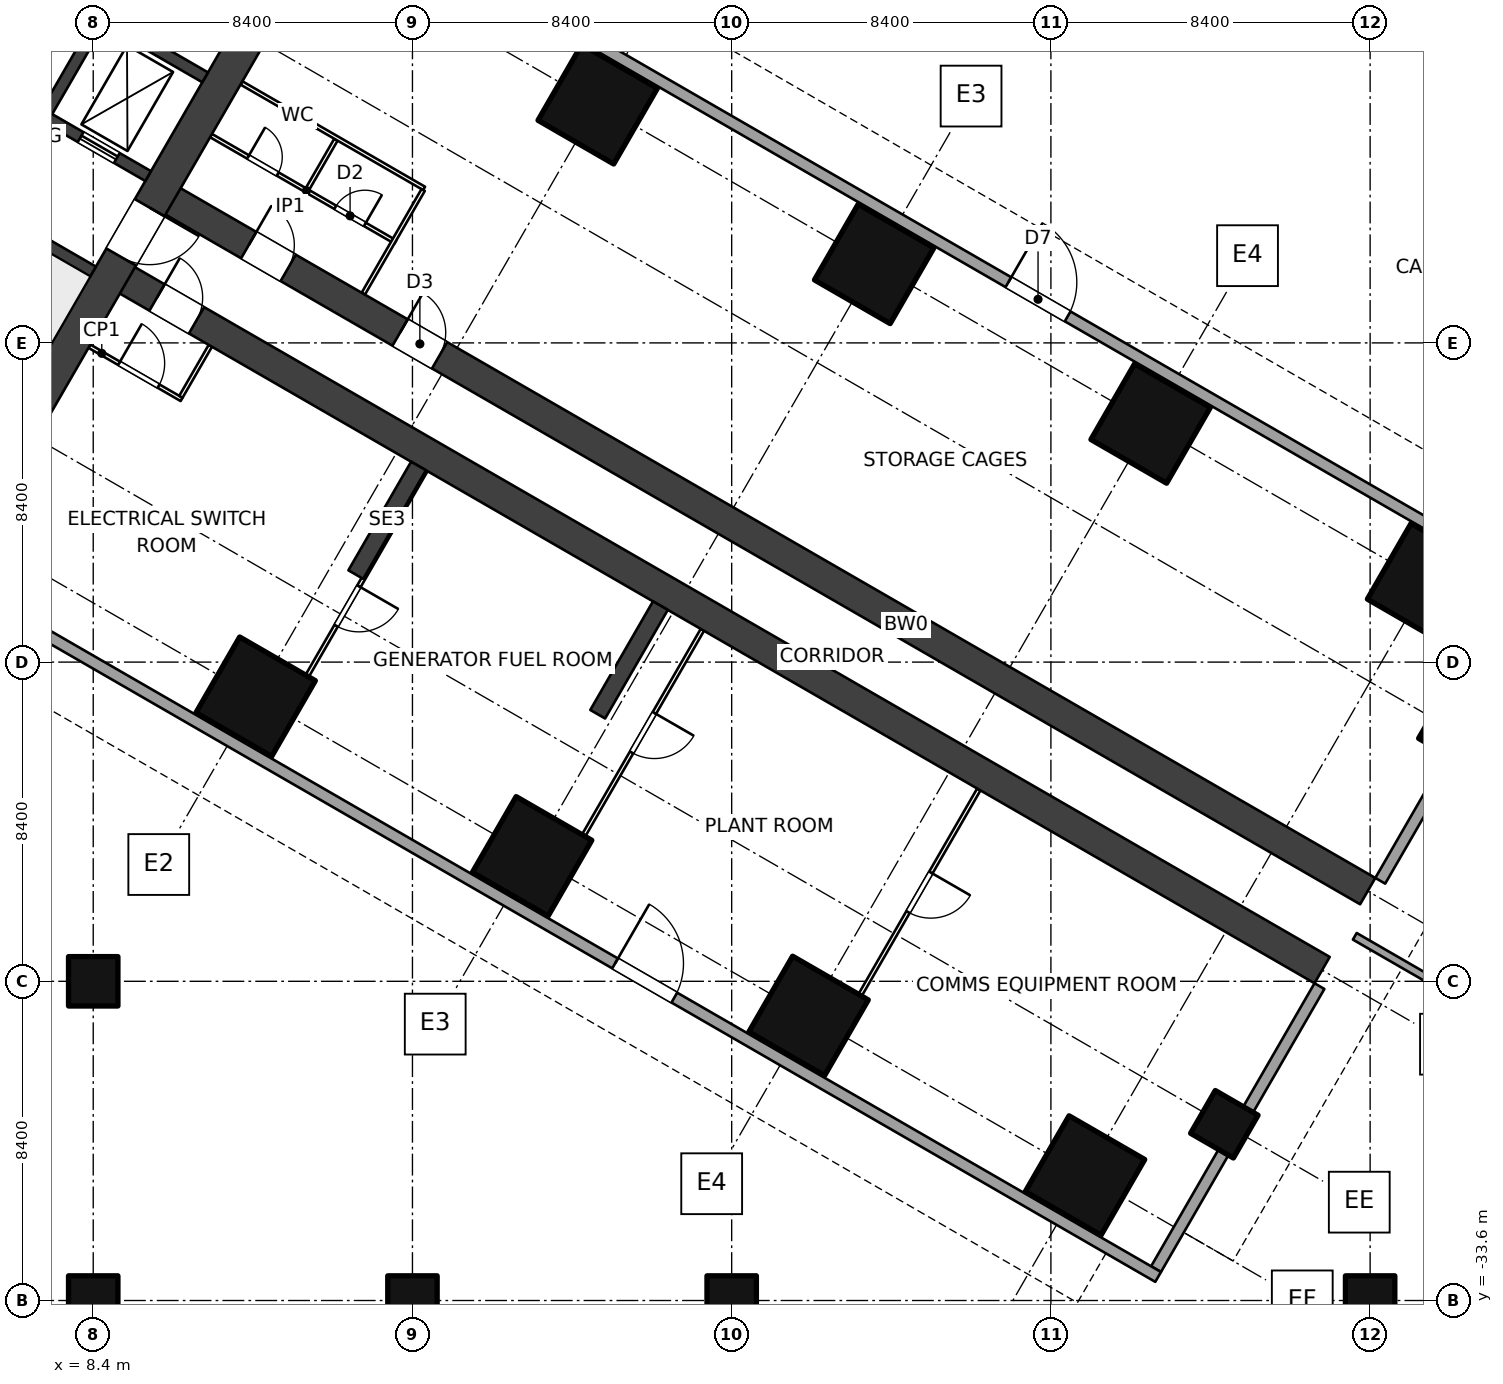
"""IFC4 building model, lengths in metres.
Left out: names, types, materials, properties, quantities, classifications, styles, units other than length and angle.
Written with IfcOpenShell. Run it as: python <this file> out.ifc"""

import sys

from ifc_helpers import new_model, si_unit, direction, frame, frame_2d, origin, origin_2d, place, context, subcontext, project, spatial, rectangle, extrude, element, fill, save


model = new_model("IFC4")
c1 = context("Model", 3, precision=1e-05, world=origin(), true_north=direction((0.0, 1.0)))
c2 = subcontext(c1, "Body", "Model", "MODEL_VIEW")
j1 = project(units=[si_unit("LENGTHUNIT", "METRE"), si_unit("PLANEANGLEUNIT", "RADIAN")], contexts=[c1])
p1 = place(None, origin())
s1 = spatial("IfcSite", under=j1, at=p1, CompositionType="ELEMENT")
p2 = place(p1, origin())
s2 = spatial("IfcBuilding", under=s1, at=p2, CompositionType="ELEMENT")
p3 = place(p2, frame((0.0, 0.0, -10.5)))
s3 = spatial("IfcBuildingStorey", under=s2, at=p3, CompositionType="ELEMENT", Elevation=-10.5)
for number, where, z_axis, x_axis in (
    (1, (21.675, -2.122, 0.0), (0.0, 0.0, 1.0), (-0.5, -0.866, 0.0)),
    (2, (12.675, -17.71, 0.0), (0.0, 0.0, 1.0), (-0.5, -0.866, 0.0)),
    (3, (28.949, -6.322, 0.0), (0.0, 0.0, 1.0), (-0.5, -0.866, 0.0)),
    (4, (19.949, -21.91, 0.0), (0.0, 0.0, 1.0), (-0.5, -0.866, 0.0)),
    (5, (36.224, -10.521, 0.0), (0.0, 0.0, 1.0), (-0.5, -0.866, 0.0)),
    (6, (27.224, -26.11, 0.0), (0.0, 0.0, 1.0), (-0.5, -0.866, 0.0)),
    (7, (43.499, -14.721, 0.0), (0.0, 0.0, 1.0), (-0.5, -0.866, 0.0)),
    (8, (34.499, -30.31, 0.0), (0.0, 0.0, 1.0), (-0.5, -0.866, 0.0)),
):
    element("IfcColumn", number, at=place(p3, frame(where, z_axis=z_axis, x_axis=x_axis)), inside=s3, PredefinedType="COLUMN", context=c2, shape_type="SweptSolid", body=[
        extrude(rectangle(XDim=2.3, YDim=2.3, at=origin_2d()), origin(), (0.0, 0.0, 1.0), 3.5),
    ])
for number, where, z_axis, x_axis in (
    (9, (44.164, -18.57, 0.0), (0.0, 0.0, 1.0), (-0.5, -0.866, 0.0)),
    (10, (38.164, -28.962, 0.0), (0.0, 0.0, 1.0), (-0.5, -0.866, 0.0)),
    (11, (8.4, -33.6, 0.0), (0.0, 0.0, 1.0), (1.0, 0.0, 0.0)),
    (12, (8.4, -25.2, 0.0), (0.0, 0.0, 1.0), (1.0, 0.0, 0.0)),
    (13, (16.8, -33.6, 0.0), (0.0, 0.0, 1.0), (1.0, 0.0, 0.0)),
    (14, (25.2, -33.6, 0.0), (0.0, 0.0, 1.0), (1.0, 0.0, 0.0)),
    (15, (42.0, -33.6, 0.0), (0.0, 0.0, 1.0), (1.0, 0.0, 0.0)),
):
    element("IfcColumn", number, at=place(p3, frame(where, z_axis=z_axis, x_axis=x_axis)), inside=s3, PredefinedType="COLUMN", context=c2, shape_type="SweptSolid", body=[
        extrude(rectangle(XDim=1.3, YDim=1.3, at=origin_2d()), origin(), (0.0, 0.0, 1.0), 3.5),
    ])
p4 = place(p3, frame((12.551, -0.225, 0.0), z_axis=(0.0, 0.0, 1.0), x_axis=(-0.499997612506, -0.8660267822, 0.0)))
e16 = element("IfcWall", 16, at=p4, inside=s3, PredefinedType="SHEAR", context=c2, shape_type="SweptSolid", body=[
    extrude(rectangle(XDim=12.161, YDim=0.9, at=frame_2d((6.08, 0.0))), origin(), (0.0, 0.0, 1.0), 3.5),
])
p5 = place(p4, frame((5.33, 0.0, 0.0)))
e17 = element("IfcOpeningElement", 17, at=p5, cuts=e16, PredefinedType="OPENING", context=c2, shape_type="SweptSolid", body=[
    extrude(rectangle(XDim=1.5, YDim=2.1, at=frame_2d((0.75, 1.05))), frame((0.0, 0.46, 0.0), z_axis=(0.0, -1.0, 0.0), x_axis=(1.0, 0.0, 0.0)), (0.0, 0.0, 1.0), 0.92),
])
p6 = place(p3, frame((2.419, -3.071, 0.0), z_axis=(0.0, 0.0, 1.0), x_axis=(0.86602711848, -0.499997030048, 0.0)))
e18 = element("IfcWall", 18, at=p6, inside=s3, PredefinedType="SHEAR", context=c2, shape_type="SweptSolid", body=[
    extrude(rectangle(XDim=6.901, YDim=0.3, at=frame_2d((3.451, 0.0))), origin(), (0.0, 0.0, 1.0), 3.5),
])
p7 = place(p6, frame((0.25, 0.0, 0.0)))
e19 = element("IfcOpeningElement", 19, at=p7, cuts=e18, PredefinedType="OPENING", context=c2, shape_type="SweptSolid", body=[
    extrude(rectangle(XDim=1.0, YDim=2.1, at=frame_2d((0.5, 1.05))), frame((0.0, 0.16, 0.0), z_axis=(0.0, -1.0, 0.0), x_axis=(1.0, 0.0, 0.0)), (0.0, 0.0, 1.0), 0.32),
])
p8 = place(p3, frame((3.869, -0.559, 0.0), z_axis=(0.0, 0.0, 1.0), x_axis=(0.86602711848, -0.499997030048, 0.0)))
e20 = element("IfcWall", 20, at=p8, inside=s3, PredefinedType="SHEAR", context=c2, shape_type="SweptSolid", body=[
    extrude(rectangle(XDim=6.901, YDim=0.3, at=frame_2d((3.451, 0.0))), origin(), (0.0, 0.0, 1.0), 3.5),
])
p9 = place(p8, frame((4.85, 0.0, 0.0)))
e21 = element("IfcOpeningElement", 21, at=p9, cuts=e20, PredefinedType="OPENING", context=c2, shape_type="SweptSolid", body=[
    extrude(rectangle(XDim=1.1, YDim=2.1, at=frame_2d((0.55, 1.05))), frame((0.0, 0.16, 0.0), z_axis=(0.0, -1.0, 0.0), x_axis=(1.0, 0.0, 0.0)), (0.0, 0.0, 1.0), 0.32),
])
p10 = place(p3, frame((5.369, 2.039, 0.0), z_axis=(0.0, 0.0, 1.0), x_axis=(0.86602711848, -0.499997030048, 0.0)))
e22 = element("IfcWall", 22, at=p10, inside=s3, PredefinedType="SHEAR", context=c2, shape_type="SweptSolid", body=[
    extrude(rectangle(XDim=6.901, YDim=0.3, at=frame_2d((3.451, 0.0))), origin(), (0.0, 0.0, 1.0), 3.5),
])
p11 = place(p3, frame((8.541, 0.034, 0.0), z_axis=(0.0, 0.0, 1.0), x_axis=(-0.50000943426, -0.866019956843, 0.0)))
e23 = element("IfcWall", 23, at=p11, inside=s3, PredefinedType="SHEAR", context=c2, shape_type="SweptSolid", body=[
    extrude(rectangle(XDim=2.7, YDim=0.3, at=frame_2d((1.35, 0.0))), origin(), (0.0, 0.0, 1.0), 3.5),
])
p12 = place(p3, frame((10.11, -4.451, 0.0), z_axis=(0.0, 0.0, 1.0), x_axis=(0.866025284237, -0.500000207062, 0.0)))
e24 = element("IfcWall", 24, at=p12, inside=s3, PredefinedType="SHEAR", context=c2, shape_type="SweptSolid", body=[
    extrude(rectangle(XDim=36.75, YDim=0.8, at=frame_2d((18.375, 0.0))), origin(), (0.0, 0.0, 1.0), 3.5),
])
p13 = place(p12, frame((2.75, 0.0, 0.0)))
e25 = element("IfcOpeningElement", 25, at=p13, cuts=e24, PredefinedType="OPENING", context=c2, shape_type="SweptSolid", body=[
    extrude(rectangle(XDim=1.2, YDim=2.1, at=frame_2d((0.6, 1.05))), frame((0.0, 0.41, 0.0), z_axis=(0.0, -1.0, 0.0), x_axis=(1.0, 0.0, 0.0)), (0.0, 0.0, 1.0), 0.82),
])
p14 = place(p12, frame((7.35, 0.0, 0.0)))
e26 = element("IfcOpeningElement", 26, at=p14, cuts=e24, PredefinedType="OPENING", context=c2, shape_type="SweptSolid", body=[
    extrude(rectangle(XDim=1.2, YDim=2.1, at=frame_2d((0.6, 1.05))), frame((0.0, 0.41, 0.0), z_axis=(0.0, -1.0, 0.0), x_axis=(1.0, 0.0, 0.0)), (0.0, 0.0, 1.0), 0.82),
])
p15 = place(p3, frame((8.91, -6.53, 0.0), z_axis=(0.0, 0.0, 1.0), x_axis=(0.866025284237, -0.500000207062, 0.0)))
e27 = element("IfcWall", 27, at=p15, inside=s3, PredefinedType="SHEAR", context=c2, shape_type="SweptSolid", body=[
    extrude(rectangle(XDim=36.75, YDim=0.8, at=frame_2d((18.375, 0.0))), origin(), (0.0, 0.0, 1.0), 3.5),
])
p16 = place(p15, frame((1.35, 0.0, 0.0)))
e28 = element("IfcOpeningElement", 28, at=p16, cuts=e27, PredefinedType="OPENING", context=c2, shape_type="SweptSolid", body=[
    extrude(rectangle(XDim=1.2, YDim=2.1, at=frame_2d((0.6, 1.05))), frame((0.0, 0.41, 0.0), z_axis=(0.0, -1.0, 0.0), x_axis=(1.0, 0.0, 0.0)), (0.0, 0.0, 1.0), 0.82),
])
p17 = place(p3, frame((11.5, -2.945, 0.0), z_axis=(0.0, 0.0, 1.0), x_axis=(0.866045472092, -0.499965239061, 0.0)))
e29 = element("IfcWall", 29, at=p17, inside=s3, PredefinedType="PARTITIONING", context=c2, shape_type="SweptSolid", body=[
    extrude(rectangle(XDim=5.6, YDim=0.1, at=frame_2d((2.8, 0.0))), origin(), (0.0, 0.0, 1.0), 3.2),
])
p18 = place(p17, frame((1.125, 0.0, 0.0)))
e30 = element("IfcOpeningElement", 30, at=p18, cuts=e29, PredefinedType="OPENING", context=c2, shape_type="SweptSolid", body=[
    extrude(rectangle(XDim=0.9, YDim=2.1, at=frame_2d((0.45, 1.05))), frame((0.0, 0.06, 0.0), z_axis=(0.0, -1.0, 0.0), x_axis=(1.0, 0.0, 0.0)), (0.0, 0.0, 1.0), 0.12),
])
p19 = place(p17, frame((3.775, 0.0, 0.0)))
e31 = element("IfcOpeningElement", 31, at=p19, cuts=e29, PredefinedType="OPENING", context=c2, shape_type="SweptSolid", body=[
    extrude(rectangle(XDim=0.9, YDim=2.1, at=frame_2d((0.45, 1.05))), frame((0.0, 0.06, 0.0), z_axis=(0.0, -1.0, 0.0), x_axis=(1.0, 0.0, 0.0)), (0.0, 0.0, 1.0), 0.12),
])
p20 = place(p3, frame((14.036, -4.351, 0.0), z_axis=(0.0, 0.0, 1.0), x_axis=(0.500060622324, 0.86599040064, 0.0)))
e32 = element("IfcWall", 32, at=p20, inside=s3, PredefinedType="PARTITIONING", context=c2, shape_type="SweptSolid", body=[
    extrude(rectangle(XDim=1.5, YDim=0.1, at=frame_2d((0.75, 0.0))), origin(), (0.0, 0.0, 1.0), 3.2),
])
p21 = place(p3, frame((12.3, -1.559, 0.0), z_axis=(0.0, 0.0, 1.0), x_axis=(0.866031018186, -0.499990275446, 0.0)))
e33 = element("IfcWall", 33, at=p21, inside=s3, PredefinedType="PARTITIONING", context=c2, shape_type="SweptSolid", body=[
    extrude(rectangle(XDim=5.55, YDim=0.1, at=frame_2d((2.775, 0.0))), origin(), (0.0, 0.0, 1.0), 3.2),
])
p22 = place(p3, frame((15.506, -7.105, 0.0), z_axis=(0.0, 0.0, 1.0), x_axis=(0.500039995618, 0.866002311072, 0.0)))
e34 = element("IfcWall", 34, at=p22, inside=s3, PredefinedType="PARTITIONING", context=c2, shape_type="SweptSolid", body=[
    extrude(rectangle(XDim=3.15, YDim=0.1, at=frame_2d((1.575, 0.0))), origin(), (0.0, 0.0, 1.0), 3.2),
])
p23 = place(p3, frame((8.3, -8.487, 0.0), z_axis=(0.0, 0.0, 1.0), x_axis=(0.866034573852, -0.49998411664, 0.0)))
e35 = element("IfcWall", 35, at=p23, inside=s3, PredefinedType="PARTITIONING", context=c2, shape_type="SweptSolid", body=[
    extrude(rectangle(XDim=2.8, YDim=0.1, at=frame_2d((1.4, 0.0))), origin(), (0.0, 0.0, 1.0), 3.2),
])
p24 = place(p23, frame((0.9, 0.0, 0.0)))
e36 = element("IfcOpeningElement", 36, at=p24, cuts=e35, PredefinedType="OPENING", context=c2, shape_type="SweptSolid", body=[
    extrude(rectangle(XDim=1.2, YDim=2.1, at=frame_2d((0.6, 1.05))), frame((0.0, 0.06, 0.0), z_axis=(0.0, -1.0, 0.0), x_axis=(1.0, 0.0, 0.0)), (0.0, 0.0, 1.0), 0.12),
])
p25 = place(p3, frame((11.482, -8.476, 0.0), z_axis=(0.0, 0.0, 1.0), x_axis=(-0.500017819788, -0.86601511528, 0.0)))
e37 = element("IfcWall", 37, at=p25, inside=s3, PredefinedType="PARTITIONING", context=c2, shape_type="SweptSolid", body=[
    extrude(rectangle(XDim=1.55, YDim=0.1, at=frame_2d((0.775, 0.0))), origin(), (0.0, 0.0, 1.0), 3.2),
])
p26 = place(p3, frame((17.154, -11.751, 0.0), z_axis=(0.0, 0.0, 1.0), x_axis=(-0.500007509209, -0.866021068297, 0.0)))
e38 = element("IfcWall", 38, at=p26, inside=s3, PredefinedType="PARTITIONING", context=c2, shape_type="SweptSolid", body=[
    extrude(rectangle(XDim=8.6, YDim=0.1, at=frame_2d((4.3, 0.0))), origin(), (0.0, 0.0, 1.0), 3.2),
])
p27 = place(p26, frame((3.525, 0.0, 0.0)))
e39 = element("IfcOpeningElement", 39, at=p27, cuts=e38, PredefinedType="OPENING", context=c2, shape_type="SweptSolid", body=[
    extrude(rectangle(XDim=1.2, YDim=2.1, at=frame_2d((0.6, 1.05))), frame((0.0, 0.06, 0.0), z_axis=(0.0, -1.0, 0.0), x_axis=(1.0, 0.0, 0.0)), (0.0, 0.0, 1.0), 0.12),
])
p28 = place(p3, frame((24.429, -15.951, 0.0), z_axis=(0.0, 0.0, 1.0), x_axis=(-0.500007509209, -0.866021068297, 0.0)))
e40 = element("IfcWall", 40, at=p28, inside=s3, PredefinedType="PARTITIONING", context=c2, shape_type="SweptSolid", body=[
    extrude(rectangle(XDim=8.6, YDim=0.1, at=frame_2d((4.3, 0.0))), origin(), (0.0, 0.0, 1.0), 3.2),
])
p29 = place(p28, frame((2.525, 0.0, 0.0)))
e41 = element("IfcOpeningElement", 41, at=p29, cuts=e40, PredefinedType="OPENING", context=c2, shape_type="SweptSolid", body=[
    extrude(rectangle(XDim=1.2, YDim=2.1, at=frame_2d((0.6, 1.05))), frame((0.0, 0.06, 0.0), z_axis=(0.0, -1.0, 0.0), x_axis=(1.0, 0.0, 0.0)), (0.0, 0.0, 1.0), 0.12),
])
p30 = place(p3, frame((31.703, -20.151, 0.0), z_axis=(0.0, 0.0, 1.0), x_axis=(-0.500007509209, -0.866021068297, 0.0)))
e42 = element("IfcWall", 42, at=p30, inside=s3, PredefinedType="PARTITIONING", context=c2, shape_type="SweptSolid", body=[
    extrude(rectangle(XDim=8.6, YDim=0.1, at=frame_2d((4.3, 0.0))), origin(), (0.0, 0.0, 1.0), 3.2),
])
p31 = place(p30, frame((2.525, 0.0, 0.0)))
e43 = element("IfcOpeningElement", 43, at=p31, cuts=e42, PredefinedType="OPENING", context=c2, shape_type="SweptSolid", body=[
    extrude(rectangle(XDim=1.2, YDim=2.1, at=frame_2d((0.6, 1.05))), frame((0.0, 0.06, 0.0), z_axis=(0.0, -1.0, 0.0), x_axis=(1.0, 0.0, 0.0)), (0.0, 0.0, 1.0), 0.12),
])
p32 = place(p3, frame((41.596, -24.016, 0.0), z_axis=(0.0, 0.0, 1.0), x_axis=(0.866034858292, -0.499983623955, 0.0)))
e44 = element("IfcWall", 44, at=p32, inside=s3, PredefinedType="SOLIDWALL", context=c2, shape_type="SweptSolid", body=[
    extrude(rectangle(XDim=10.627, YDim=0.2, at=frame_2d((5.313, 0.0))), origin(), (0.0, 0.0, 1.0), 3.2),
])
for number, where, z_axis, x_axis in (
    (45, (42.267, -22.555, 0.0), (0.0, 0.0, 1.0), (0.5, 0.866, 0.0)),
    (46, (40.667, -25.326, 0.0), (0.0, 0.0, 1.0), (-0.5, -0.866, 0.0)),
):
    element("IfcWall", number, at=place(p3, frame(where, z_axis=z_axis, x_axis=x_axis)), inside=s3, PredefinedType="SOLIDWALL", context=c2, shape_type="SweptSolid", body=[
        extrude(rectangle(XDim=8.6, YDim=0.3, at=frame_2d((4.3, 0.0))), origin(), (0.0, 0.0, 1.0), 1.9),
    ])
p33 = place(p3, frame((9.45, 6.495, 0.0), z_axis=(0.0, 0.0, 1.0), x_axis=(0.866025301493, -0.500000177174, 0.0)))
e47 = element("IfcWall", 47, at=p33, inside=s3, PredefinedType="SOLIDWALL", context=c2, shape_type="SweptSolid", body=[
    extrude(rectangle(XDim=43.095, YDim=0.3, at=frame_2d((21.548, 0.0))), origin(), (0.0, 0.0, 1.0), 3.2),
])
p34 = place(p33, frame((26.595, 0.0, 0.0)))
e48 = element("IfcOpeningElement", 48, at=p34, cuts=e47, PredefinedType="OPENING", context=c2, shape_type="SweptSolid", body=[
    extrude(rectangle(XDim=1.8, YDim=2.4, at=frame_2d((0.9, 1.2))), frame((0.0, 0.16, 0.0), z_axis=(0.0, -1.0, 0.0), x_axis=(1.0, 0.0, 0.0)), (0.0, 0.0, 1.0), 0.32),
])
p35 = place(p3, frame((-0.9, -11.432, 0.0), z_axis=(0.0, 0.0, 1.0), x_axis=(0.866025301493, -0.500000177174, 0.0)))
e49 = element("IfcWall", 49, at=p35, inside=s3, PredefinedType="SOLIDWALL", context=c2, shape_type="SweptSolid", body=[
    extrude(rectangle(XDim=43.095, YDim=0.3, at=frame_2d((21.548, 0.0))), origin(), (0.0, 0.0, 1.0), 3.2),
])
p36 = place(p35, frame((26.595, 0.0, 0.0)))
e50 = element("IfcOpeningElement", 50, at=p36, cuts=e49, PredefinedType="OPENING", context=c2, shape_type="SweptSolid", body=[
    extrude(rectangle(XDim=1.8, YDim=2.4, at=frame_2d((0.9, 1.2))), frame((0.0, 0.16, 0.0), z_axis=(0.0, -1.0, 0.0), x_axis=(1.0, 0.0, 0.0)), (0.0, 0.0, 1.0), 0.32),
])
for number, where, z_axis, x_axis in (
    (51, (16.959, -11.639, 0.0), (0.0, 0.0, 1.0), (-0.5, -0.866, 0.0)),
    (52, (23.324, -15.314, 0.0), (0.0, 0.0, 1.0), (-0.5, -0.866, 0.0)),
):
    element("IfcWall", number, at=place(p3, frame(where, z_axis=z_axis, x_axis=x_axis)), inside=s3, PredefinedType="SOLIDWALL", context=c2, shape_type="SweptSolid", body=[
        extrude(rectangle(XDim=3.3, YDim=0.45, at=frame_2d((1.65, 0.0))), origin(), (0.0, 0.0, 1.0), 3.5),
    ])
p37 = place(p9, origin())
e53 = element("IfcDoor", 53, at=p37, inside=s3, OperationType="DOUBLE_DOOR_SLIDING", PredefinedType="DOOR", context=c2, shape_type="SweptSolid", body=[
    extrude(rectangle(XDim=1.1, YDim=2.1, at=frame_2d((0.55, 1.05))), frame((0.0, 0.025, 0.0), z_axis=(0.0, -1.0, 0.0), x_axis=(1.0, 0.0, 0.0)), (0.0, 0.0, 1.0), 0.05),
])
fill(e21, e53)
p38 = place(p5, origin())
e54 = element("IfcDoor", 54, at=p38, inside=s3, OperationType="DOUBLE_DOOR_DOUBLE_SWING", PredefinedType="DOOR", context=c2, shape_type="SweptSolid", body=[
    extrude(rectangle(XDim=1.5, YDim=2.1, at=frame_2d((0.75, 1.05))), frame((0.0, 0.025, 0.0), z_axis=(0.0, -1.0, 0.0), x_axis=(1.0, 0.0, 0.0)), (0.0, 0.0, 1.0), 0.05),
])
fill(e17, e54)
p39 = place(p18, origin())
e55 = element("IfcDoor", 55, at=p39, inside=s3, OperationType="SINGLE_SWING_LEFT", PredefinedType="DOOR", context=c2, shape_type="SweptSolid", body=[
    extrude(rectangle(XDim=0.9, YDim=2.1, at=frame_2d((0.45, 1.05))), frame((0.0, 0.025, 0.0), z_axis=(0.0, -1.0, 0.0), x_axis=(1.0, 0.0, 0.0)), (0.0, 0.0, 1.0), 0.05),
])
fill(e30, e55)
p40 = place(p19, origin())
e56 = element("IfcDoor", 56, at=p40, inside=s3, OperationType="SINGLE_SWING_RIGHT", PredefinedType="DOOR", context=c2, shape_type="SweptSolid", body=[
    extrude(rectangle(XDim=0.9, YDim=2.1, at=frame_2d((0.45, 1.05))), frame((0.0, 0.025, 0.0), z_axis=(0.0, -1.0, 0.0), x_axis=(1.0, 0.0, 0.0)), (0.0, 0.0, 1.0), 0.05),
])
fill(e31, e56)
p41 = place(p13, origin())
e57 = element("IfcDoor", 57, at=p41, inside=s3, OperationType="DOUBLE_SWING_LEFT", PredefinedType="DOOR", context=c2, shape_type="SweptSolid", body=[
    extrude(rectangle(XDim=1.2, YDim=2.1, at=frame_2d((0.6, 1.05))), frame((0.0, 0.025, 0.0), z_axis=(0.0, -1.0, 0.0), x_axis=(1.0, 0.0, 0.0)), (0.0, 0.0, 1.0), 0.05),
])
fill(e25, e57)
p42 = place(p14, origin())
e58 = element("IfcDoor", 58, at=p42, inside=s3, OperationType="DOUBLE_SWING_LEFT", PredefinedType="DOOR", context=c2, shape_type="SweptSolid", body=[
    extrude(rectangle(XDim=1.2, YDim=2.1, at=frame_2d((0.6, 1.05))), frame((0.0, 0.025, 0.0), z_axis=(0.0, -1.0, 0.0), x_axis=(1.0, 0.0, 0.0)), (0.0, 0.0, 1.0), 0.05),
])
fill(e26, e58)
p43 = place(p16, origin())
e59 = element("IfcDoor", 59, at=p43, inside=s3, OperationType="DOUBLE_SWING_LEFT", PredefinedType="DOOR", context=c2, shape_type="SweptSolid", body=[
    extrude(rectangle(XDim=1.2, YDim=2.1, at=frame_2d((0.6, 1.05))), frame((0.0, 0.025, 0.0), z_axis=(0.0, -1.0, 0.0), x_axis=(1.0, 0.0, 0.0)), (0.0, 0.0, 1.0), 0.05),
])
fill(e28, e59)
p44 = place(p27, origin())
e60 = element("IfcDoor", 60, at=p44, inside=s3, OperationType="DOUBLE_SWING_LEFT", PredefinedType="DOOR", context=c2, shape_type="SweptSolid", body=[
    extrude(rectangle(XDim=1.2, YDim=2.1, at=frame_2d((0.6, 1.05))), frame((0.0, 0.025, 0.0), z_axis=(0.0, -1.0, 0.0), x_axis=(1.0, 0.0, 0.0)), (0.0, 0.0, 1.0), 0.05),
])
fill(e39, e60)
p45 = place(p29, origin())
e61 = element("IfcDoor", 61, at=p45, inside=s3, OperationType="DOUBLE_SWING_LEFT", PredefinedType="DOOR", context=c2, shape_type="SweptSolid", body=[
    extrude(rectangle(XDim=1.2, YDim=2.1, at=frame_2d((0.6, 1.05))), frame((0.0, 0.025, 0.0), z_axis=(0.0, -1.0, 0.0), x_axis=(1.0, 0.0, 0.0)), (0.0, 0.0, 1.0), 0.05),
])
fill(e41, e61)
p46 = place(p31, origin())
e62 = element("IfcDoor", 62, at=p46, inside=s3, OperationType="DOUBLE_SWING_LEFT", PredefinedType="DOOR", context=c2, shape_type="SweptSolid", body=[
    extrude(rectangle(XDim=1.2, YDim=2.1, at=frame_2d((0.6, 1.05))), frame((0.0, 0.025, 0.0), z_axis=(0.0, -1.0, 0.0), x_axis=(1.0, 0.0, 0.0)), (0.0, 0.0, 1.0), 0.05),
])
fill(e43, e62)
p47 = place(p24, origin())
e63 = element("IfcDoor", 63, at=p47, inside=s3, OperationType="DOUBLE_SWING_LEFT", PredefinedType="DOOR", context=c2, shape_type="SweptSolid", body=[
    extrude(rectangle(XDim=1.2, YDim=2.1, at=frame_2d((0.6, 1.05))), frame((0.0, 0.025, 0.0), z_axis=(0.0, -1.0, 0.0), x_axis=(1.0, 0.0, 0.0)), (0.0, 0.0, 1.0), 0.05),
])
fill(e36, e63)
p48 = place(p34, origin())
e64 = element("IfcDoor", 64, at=p48, inside=s3, OperationType="DOUBLE_DOOR_DOUBLE_SWING", PredefinedType="DOOR", context=c2, shape_type="SweptSolid", body=[
    extrude(rectangle(XDim=1.8, YDim=2.4, at=frame_2d((0.9, 1.2))), frame((0.0, 0.025, 0.0), z_axis=(0.0, -1.0, 0.0), x_axis=(1.0, 0.0, 0.0)), (0.0, 0.0, 1.0), 0.05),
])
fill(e48, e64)
p49 = place(p36, origin())
e65 = element("IfcDoor", 65, at=p49, inside=s3, OperationType="DOUBLE_DOOR_DOUBLE_SWING", PredefinedType="DOOR", context=c2, shape_type="SweptSolid", body=[
    extrude(rectangle(XDim=1.8, YDim=2.4, at=frame_2d((0.9, 1.2))), frame((0.0, 0.025, 0.0), z_axis=(0.0, -1.0, 0.0), x_axis=(1.0, 0.0, 0.0)), (0.0, 0.0, 1.0), 0.05),
])
fill(e50, e65)
save(model, sys.argv[1])
